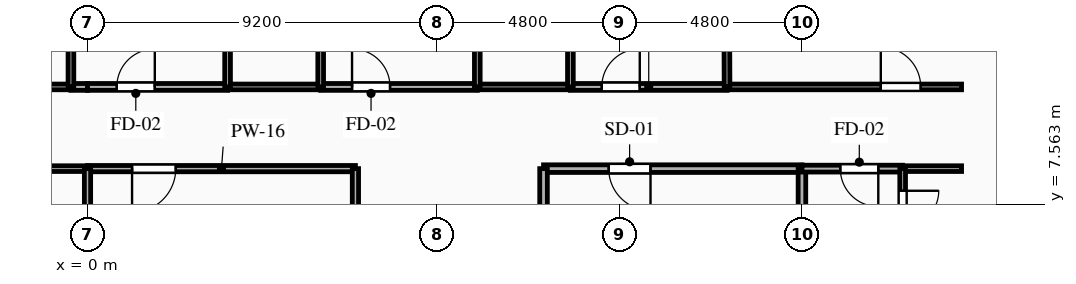
"""IFC4 building model, lengths in metres.
Left out: names, types, materials, properties, quantities, classifications, styles, units other than length and angle.
Written with IfcOpenShell. Run it as: python <this file> out.ifc"""

import sys

from ifc_helpers import new_model, si_unit, direction, frame, frame_2d, origin, place, context, subcontext, project, spatial, rectangle, extrude, element, fill, save


model = new_model("IFC4")
c1 = context("Model", 3, precision=1e-05, world=origin(), true_north=direction((0.0, 1.0)))
c2 = subcontext(c1, "Body", "Model", "MODEL_VIEW")
j1 = project(units=[si_unit("LENGTHUNIT", "METRE"), si_unit("PLANEANGLEUNIT", "RADIAN")], contexts=[c1])
p1 = place(None, origin())
s1 = spatial("IfcSite", under=j1, at=p1, CompositionType="ELEMENT")
p2 = place(p1, origin())
s2 = spatial("IfcBuilding", under=s1, at=p2, CompositionType="ELEMENT")
p3 = place(p2, frame((0.0, 0.0, 85.7)))
s3 = spatial("IfcBuildingStorey", under=s2, at=p3, CompositionType="ELEMENT", Elevation=85.7)
p4 = place(p3, frame((18.8, 8.5, 0.0), z_axis=(0.0, 0.0, 1.0), x_axis=(-1.0, 0.0, 0.0)))
e1 = element("IfcWall", 1, at=p4, inside=s3, PredefinedType="PARTITIONING", context=c2, shape_type="SweptSolid", body=[
    extrude(rectangle(XDim=6.8, YDim=0.2, at=frame_2d((3.4, 0.0))), origin(), (0.0, 0.0, 1.0), 3.045),
])
p5 = place(p4, frame((3.985, 0.0, 0.0)))
e2 = element("IfcOpeningElement", 2, at=p5, cuts=e1, PredefinedType="OPENING", context=c2, shape_type="SweptSolid", body=[
    extrude(rectangle(XDim=1.1, YDim=2.15, at=frame_2d((0.55, 1.075))), frame((0.0, 0.11, 0.0), z_axis=(0.0, -1.0, 0.0), x_axis=(1.0, 0.0, 0.0)), (0.0, 0.0, 1.0), 0.22),
])
p6 = place(p3, frame((12.0, 8.5, 0.0), z_axis=(0.0, 0.0, 1.0), x_axis=(0.0, -1.0, 0.0)))
e3 = element("IfcWall", 3, at=p6, inside=s3, PredefinedType="PARTITIONING", context=c2, shape_type="SweptSolid", body=[
    extrude(rectangle(XDim=2.9, YDim=0.2, at=frame_2d((1.45, 0.0))), origin(), (0.0, 0.0, 1.0), 3.045),
])
p7 = place(p3, frame((18.8, 5.6, 0.0), z_axis=(0.0, 0.0, 1.0), x_axis=(0.0, 1.0, 0.0)))
e4 = element("IfcWall", 4, at=p7, inside=s3, PredefinedType="PARTITIONING", context=c2, shape_type="SweptSolid", body=[
    extrude(rectangle(XDim=2.9, YDim=0.2, at=frame_2d((1.45, 0.0))), origin(), (0.0, 0.0, 1.0), 2.53),
])
p8 = place(p3, frame((-0.436, 10.65, 0.0), z_axis=(0.0, 0.0, 1.0), x_axis=(1.0, 0.0, 0.0)))
e5 = element("IfcWall", 5, at=p8, inside=s3, PredefinedType="PARTITIONING", context=c2, shape_type="SweptSolid", body=[
    extrude(rectangle(XDim=0.436, YDim=0.18, at=frame_2d((0.218, 0.0))), origin(), (0.0, 0.0, 1.0), 3.045),
])
p9 = place(p3, frame((-2.886, 10.65, 0.0), z_axis=(0.0, 0.0, 1.0), x_axis=(1.0, 0.0, 0.0)))
e6 = element("IfcWall", 6, at=p9, inside=s3, PredefinedType="PLUMBINGWALL", context=c2, shape_type="SweptSolid", body=[
    extrude(rectangle(XDim=2.45, YDim=0.15, at=frame_2d((1.225, 0.0))), origin(), (0.0, 0.0, 1.0), 3.045),
])
p10 = place(p3, frame((0.0, 8.5, 0.0), z_axis=(0.0, 0.0, 1.0), x_axis=(-1.0, 0.0, 0.0)))
e7 = element("IfcWall", 7, at=p10, inside=s3, PredefinedType="PARTITIONING", context=c2, shape_type="SweptSolid", body=[
    extrude(rectangle(XDim=7.05, YDim=0.15, at=frame_2d((3.525, 0.0))), origin(), (0.0, 0.0, 1.0), 3.045),
])
p11 = place(p3, frame((21.45, 8.5, 0.0), z_axis=(0.0, 0.0, 1.0), x_axis=(-1.0, 0.0, 0.0)))
e8 = element("IfcWall", 8, at=p11, inside=s3, PredefinedType="PARTITIONING", context=c2, shape_type="SweptSolid", body=[
    extrude(rectangle(XDim=2.65, YDim=0.18, at=frame_2d((1.325, 0.0))), origin(), (0.0, 0.0, 1.0), 3.045),
])
p12 = place(p11, frame((0.641, 0.0, 0.0)))
e9 = element("IfcOpeningElement", 9, at=p12, cuts=e8, PredefinedType="OPENING", context=c2, shape_type="SweptSolid", body=[
    extrude(rectangle(XDim=1.0, YDim=2.15, at=frame_2d((0.5, 1.075))), frame((0.0, 0.1, 0.0), z_axis=(0.0, -1.0, 0.0), x_axis=(1.0, 0.0, 0.0)), (0.0, 0.0, 1.0), 0.2),
])
p13 = place(p3, frame((23.0, 8.5, 0.0), z_axis=(0.0, 0.0, 1.0), x_axis=(-1.0, 0.0, 0.0)))
e10 = element("IfcWall", 10, at=p13, inside=s3, PredefinedType="PARTITIONING", context=c2, shape_type="SweptSolid", body=[
    extrude(rectangle(XDim=1.55, YDim=0.15, at=frame_2d((0.775, 0.0))), origin(), (0.0, 0.0, 1.0), 3.045),
])
p14 = place(p3, frame((0.0, 10.65, 0.0), z_axis=(0.0, 0.0, 1.0), x_axis=(1.0, 0.0, 0.0)))
e11 = element("IfcWall", 11, at=p14, inside=s3, PredefinedType="PARTITIONING", context=c2, shape_type="SweptSolid", body=[
    extrude(rectangle(XDim=3.686, YDim=0.18, at=frame_2d((1.843, 0.0))), origin(), (0.0, 0.0, 1.0), 3.045),
])
p15 = place(p14, frame((0.771, 0.0, 0.0)))
e12 = element("IfcOpeningElement", 12, at=p15, cuts=e11, PredefinedType="OPENING", context=c2, shape_type="SweptSolid", body=[
    extrude(rectangle(XDim=1.0, YDim=2.15, at=frame_2d((0.5, 1.075))), frame((0.0, 0.1, 0.0), z_axis=(0.0, -1.0, 0.0), x_axis=(1.0, 0.0, 0.0)), (0.0, 0.0, 1.0), 0.2),
])
p16 = place(p3, frame((6.136, 10.65, 0.0), z_axis=(0.0, 0.0, 1.0), x_axis=(1.0, 0.0, 0.0)))
e13 = element("IfcWall", 13, at=p16, inside=s3, PredefinedType="PARTITIONING", context=c2, shape_type="SweptSolid", body=[
    extrude(rectangle(XDim=4.121, YDim=0.18, at=frame_2d((2.061, 0.0))), origin(), (0.0, 0.0, 1.0), 3.045),
])
p17 = place(p16, frame((0.825, 0.0, 0.0)))
e14 = element("IfcOpeningElement", 14, at=p17, cuts=e13, PredefinedType="OPENING", context=c2, shape_type="SweptSolid", body=[
    extrude(rectangle(XDim=1.0, YDim=2.15, at=frame_2d((0.5, 1.075))), frame((0.0, 0.1, 0.0), z_axis=(0.0, -1.0, 0.0), x_axis=(1.0, 0.0, 0.0)), (0.0, 0.0, 1.0), 0.2),
])
p18 = place(p3, frame((3.686, 10.65, 0.0), z_axis=(0.0, 0.0, 1.0), x_axis=(1.0, 0.0, 0.0)))
e15 = element("IfcWall", 15, at=p18, inside=s3, PredefinedType="PLUMBINGWALL", context=c2, shape_type="SweptSolid", body=[
    extrude(rectangle(XDim=2.45, YDim=0.15, at=frame_2d((1.225, 0.0))), origin(), (0.0, 0.0, 1.0), 3.045),
])
p19 = place(p3, frame((12.707, 10.65, 0.0), z_axis=(0.0, 0.0, 1.0), x_axis=(1.0, 0.0, 0.0)))
e16 = element("IfcWall", 16, at=p19, inside=s3, PredefinedType="PARTITIONING", context=c2, shape_type="SweptSolid", body=[
    extrude(rectangle(XDim=4.122, YDim=0.18, at=frame_2d((2.061, 0.0))), origin(), (0.0, 0.0, 1.0), 3.045),
])
p20 = place(p19, frame((0.825, 0.0, 0.0)))
e17 = element("IfcOpeningElement", 17, at=p20, cuts=e16, PredefinedType="OPENING", context=c2, shape_type="SweptSolid", body=[
    extrude(rectangle(XDim=1.0, YDim=2.15, at=frame_2d((0.5, 1.075))), frame((0.0, 0.1, 0.0), z_axis=(0.0, -1.0, 0.0), x_axis=(1.0, 0.0, 0.0)), (0.0, 0.0, 1.0), 0.2),
])
p21 = place(p3, frame((10.257, 10.65, 0.0), z_axis=(0.0, 0.0, 1.0), x_axis=(1.0, 0.0, 0.0)))
e18 = element("IfcWall", 18, at=p21, inside=s3, PredefinedType="PLUMBINGWALL", context=c2, shape_type="SweptSolid", body=[
    extrude(rectangle(XDim=2.45, YDim=0.15, at=frame_2d((1.225, 0.0))), origin(), (0.0, 0.0, 1.0), 3.045),
])
p22 = place(p3, frame((16.829, 10.65, 0.0), z_axis=(0.0, 0.0, 1.0), x_axis=(1.0, 0.0, 0.0)))
e19 = element("IfcWall", 19, at=p22, inside=s3, PredefinedType="PARTITIONING", context=c2, shape_type="SweptSolid", body=[
    extrude(rectangle(XDim=6.171, YDim=0.15, at=frame_2d((3.085, 0.0))), origin(), (0.0, 0.0, 1.0), 3.045),
])
p23 = place(p22, frame((4.046, 0.0, 0.0)))
e20 = element("IfcOpeningElement", 20, at=p23, cuts=e19, PredefinedType="OPENING", context=c2, shape_type="SweptSolid", body=[
    extrude(rectangle(XDim=1.05, YDim=2.15, at=frame_2d((0.525, 1.075))), frame((0.0, 0.085, 0.0), z_axis=(0.0, -1.0, 0.0), x_axis=(1.0, 0.0, 0.0)), (0.0, 0.0, 1.0), 0.17),
])
p24 = place(p3, frame((7.05, 8.5, 0.0), z_axis=(0.0, 0.0, 1.0), x_axis=(-1.0, 0.0, 0.0)))
e21 = element("IfcWall", 21, at=p24, inside=s3, PredefinedType="PARTITIONING", context=c2, shape_type="SweptSolid", body=[
    extrude(rectangle(XDim=7.05, YDim=0.165, at=frame_2d((3.525, 0.0))), origin(), (0.0, 0.0, 1.0), 3.045),
])
p25 = place(p24, frame((4.728, 0.0, 0.0)))
e22 = element("IfcOpeningElement", 22, at=p25, cuts=e21, PredefinedType="OPENING", context=c2, shape_type="SweptSolid", body=[
    extrude(rectangle(XDim=1.15, YDim=2.15, at=frame_2d((0.575, 1.075))), frame((0.0, 0.093, 0.0), z_axis=(0.0, -1.0, 0.0), x_axis=(1.0, 0.0, 0.0)), (0.0, 0.0, 1.0), 0.185),
])
p26 = place(p3, frame((7.05, 1.45, 0.0), z_axis=(0.0, 0.0, 1.0), x_axis=(0.0, 1.0, 0.0)))
e23 = element("IfcWall", 23, at=p26, inside=s3, PredefinedType="PARTITIONING", context=c2, shape_type="SweptSolid", body=[
    extrude(rectangle(XDim=7.05, YDim=0.165, at=frame_2d((3.525, 0.0))), origin(), (0.0, 0.0, 1.0), 3.045),
])
p27 = place(p3, frame((21.45, 8.5, 0.0), z_axis=(0.0, 0.0, 1.0), x_axis=(0.0, -1.0, 0.0)))
e24 = element("IfcWall", 24, at=p27, inside=s3, PredefinedType="PARTITIONING", context=c2, shape_type="SweptSolid", body=[
    extrude(rectangle(XDim=2.115, YDim=0.15, at=frame_2d((1.058, 0.0))), origin(), (0.0, 0.0, 1.0), 3.045),
])
p28 = place(p27, frame((0.583, 0.0, 0.0)))
e25 = element("IfcOpeningElement", 25, at=p28, cuts=e24, PredefinedType="OPENING", context=c2, shape_type="SweptSolid", body=[
    extrude(rectangle(XDim=0.95, YDim=2.1, at=frame_2d((0.475, 1.05))), frame((0.0, 0.085, 0.0), z_axis=(0.0, -1.0, 0.0), x_axis=(1.0, 0.0, 0.0)), (0.0, 0.0, 1.0), 0.17),
])
for number, where, z_axis, x_axis in (
    (26, (-0.436, 10.65, 0.0), (0.0, 0.0, 1.0), (0.0, 1.0, 0.0)),
    (27, (3.686, 12.8, 0.0), (0.0, 0.0, 1.0), (0.0, -1.0, 0.0)),
    (28, (6.136, 10.65, 0.0), (0.0, 0.0, 1.0), (0.0, 1.0, 0.0)),
    (29, (10.257, 12.8, 0.0), (0.0, 0.0, 1.0), (0.0, -1.0, 0.0)),
    (30, (12.707, 10.65, 0.0), (0.0, 0.0, 1.0), (0.0, 1.0, 0.0)),
):
    element("IfcWall", number, at=place(p3, frame(where, z_axis=z_axis, x_axis=x_axis)), inside=s3, PredefinedType="PLUMBINGWALL", context=c2, shape_type="SweptSolid", body=[
        extrude(rectangle(XDim=2.15, YDim=0.15, at=frame_2d((1.075, 0.0))), origin(), (0.0, 0.0, 1.0), 3.045),
    ])
p29 = place(p3, frame((16.785, 22.199, 0.0), z_axis=(0.0, 0.0, 1.0), x_axis=(0.003805067053, -0.999992760706, 0.0)))
e31 = element("IfcWall", 31, at=p29, inside=s3, PredefinedType="PARTITIONING", context=c2, shape_type="SweptSolid", body=[
    extrude(rectangle(XDim=11.549, YDim=0.15, at=frame_2d((5.774, 0.0))), origin(), (0.0, 0.0, 1.0), 3.045),
])
p30 = place(p3, frame((0.0, 8.5, 0.0), z_axis=(0.0, 0.0, 1.0), x_axis=(0.0, -1.0, 0.0)))
e32 = element("IfcWall", 32, at=p30, inside=s3, PredefinedType="PARTITIONING", context=c2, shape_type="SweptSolid", body=[
    extrude(rectangle(XDim=7.05, YDim=0.165, at=frame_2d((3.525, 0.0))), origin(), (0.0, 0.0, 1.0), 3.045),
])
p31 = place(p5, origin())
e33 = element("IfcDoor", 33, at=p31, inside=s3, OperationType="SINGLE_SWING_LEFT", PredefinedType="DOOR", context=c2, shape_type="SweptSolid", body=[
    extrude(rectangle(XDim=1.1, YDim=2.15, at=frame_2d((0.55, 1.075))), frame((0.0, 0.025, 0.0), z_axis=(0.0, -1.0, 0.0), x_axis=(1.0, 0.0, 0.0)), (0.0, 0.0, 1.0), 0.05),
])
fill(e2, e33)
p32 = place(p12, origin())
e34 = element("IfcDoor", 34, at=p32, inside=s3, OperationType="SINGLE_SWING_LEFT", PredefinedType="DOOR", context=c2, shape_type="SweptSolid", body=[
    extrude(rectangle(XDim=1.0, YDim=2.15, at=frame_2d((0.5, 1.075))), frame((0.0, 0.025, 0.0), z_axis=(0.0, -1.0, 0.0), x_axis=(1.0, 0.0, 0.0)), (0.0, 0.0, 1.0), 0.05),
])
fill(e9, e34)
p33 = place(p15, origin())
e35 = element("IfcDoor", 35, at=p33, inside=s3, OperationType="SINGLE_SWING_RIGHT", PredefinedType="DOOR", context=c2, shape_type="SweptSolid", body=[
    extrude(rectangle(XDim=1.0, YDim=2.15, at=frame_2d((0.5, 1.075))), frame((0.0, 0.025, 0.0), z_axis=(0.0, -1.0, 0.0), x_axis=(1.0, 0.0, 0.0)), (0.0, 0.0, 1.0), 0.05),
])
fill(e12, e35)
p34 = place(p17, origin())
e36 = element("IfcDoor", 36, at=p34, inside=s3, OperationType="SINGLE_SWING_LEFT", PredefinedType="DOOR", context=c2, shape_type="SweptSolid", body=[
    extrude(rectangle(XDim=1.0, YDim=2.15, at=frame_2d((0.5, 1.075))), frame((0.0, 0.025, 0.0), z_axis=(0.0, -1.0, 0.0), x_axis=(1.0, 0.0, 0.0)), (0.0, 0.0, 1.0), 0.05),
])
fill(e14, e36)
p35 = place(p20, origin())
e37 = element("IfcDoor", 37, at=p35, inside=s3, OperationType="SINGLE_SWING_RIGHT", PredefinedType="DOOR", context=c2, shape_type="SweptSolid", body=[
    extrude(rectangle(XDim=1.0, YDim=2.15, at=frame_2d((0.5, 1.075))), frame((0.0, 0.025, 0.0), z_axis=(0.0, -1.0, 0.0), x_axis=(1.0, 0.0, 0.0)), (0.0, 0.0, 1.0), 0.05),
])
fill(e17, e37)
p36 = place(p23, origin())
e38 = element("IfcDoor", 38, at=p36, inside=s3, OperationType="SINGLE_SWING_LEFT", PredefinedType="DOOR", context=c2, shape_type="SweptSolid", body=[
    extrude(rectangle(XDim=1.05, YDim=2.15, at=frame_2d((0.525, 1.075))), frame((0.0, 0.025, 0.0), z_axis=(0.0, -1.0, 0.0), x_axis=(1.0, 0.0, 0.0)), (0.0, 0.0, 1.0), 0.05),
])
fill(e20, e38)
p37 = place(p25, origin())
e39 = element("IfcDoor", 39, at=p37, inside=s3, OperationType="SINGLE_SWING_RIGHT", PredefinedType="DOOR", context=c2, shape_type="SweptSolid", body=[
    extrude(rectangle(XDim=1.15, YDim=2.15, at=frame_2d((0.575, 1.075))), frame((0.0, 0.025, 0.0), z_axis=(0.0, -1.0, 0.0), x_axis=(1.0, 0.0, 0.0)), (0.0, 0.0, 1.0), 0.05),
])
fill(e22, e39)
p38 = place(p28, origin())
e40 = element("IfcDoor", 40, at=p38, inside=s3, OperationType="SINGLE_SWING_LEFT", PredefinedType="DOOR", context=c2, shape_type="SweptSolid", body=[
    extrude(rectangle(XDim=0.95, YDim=2.1, at=frame_2d((0.475, 1.05))), frame((0.0, 0.025, 0.0), z_axis=(0.0, -1.0, 0.0), x_axis=(1.0, 0.0, 0.0)), (0.0, 0.0, 1.0), 0.05),
])
fill(e25, e40)
save(model, sys.argv[1])
